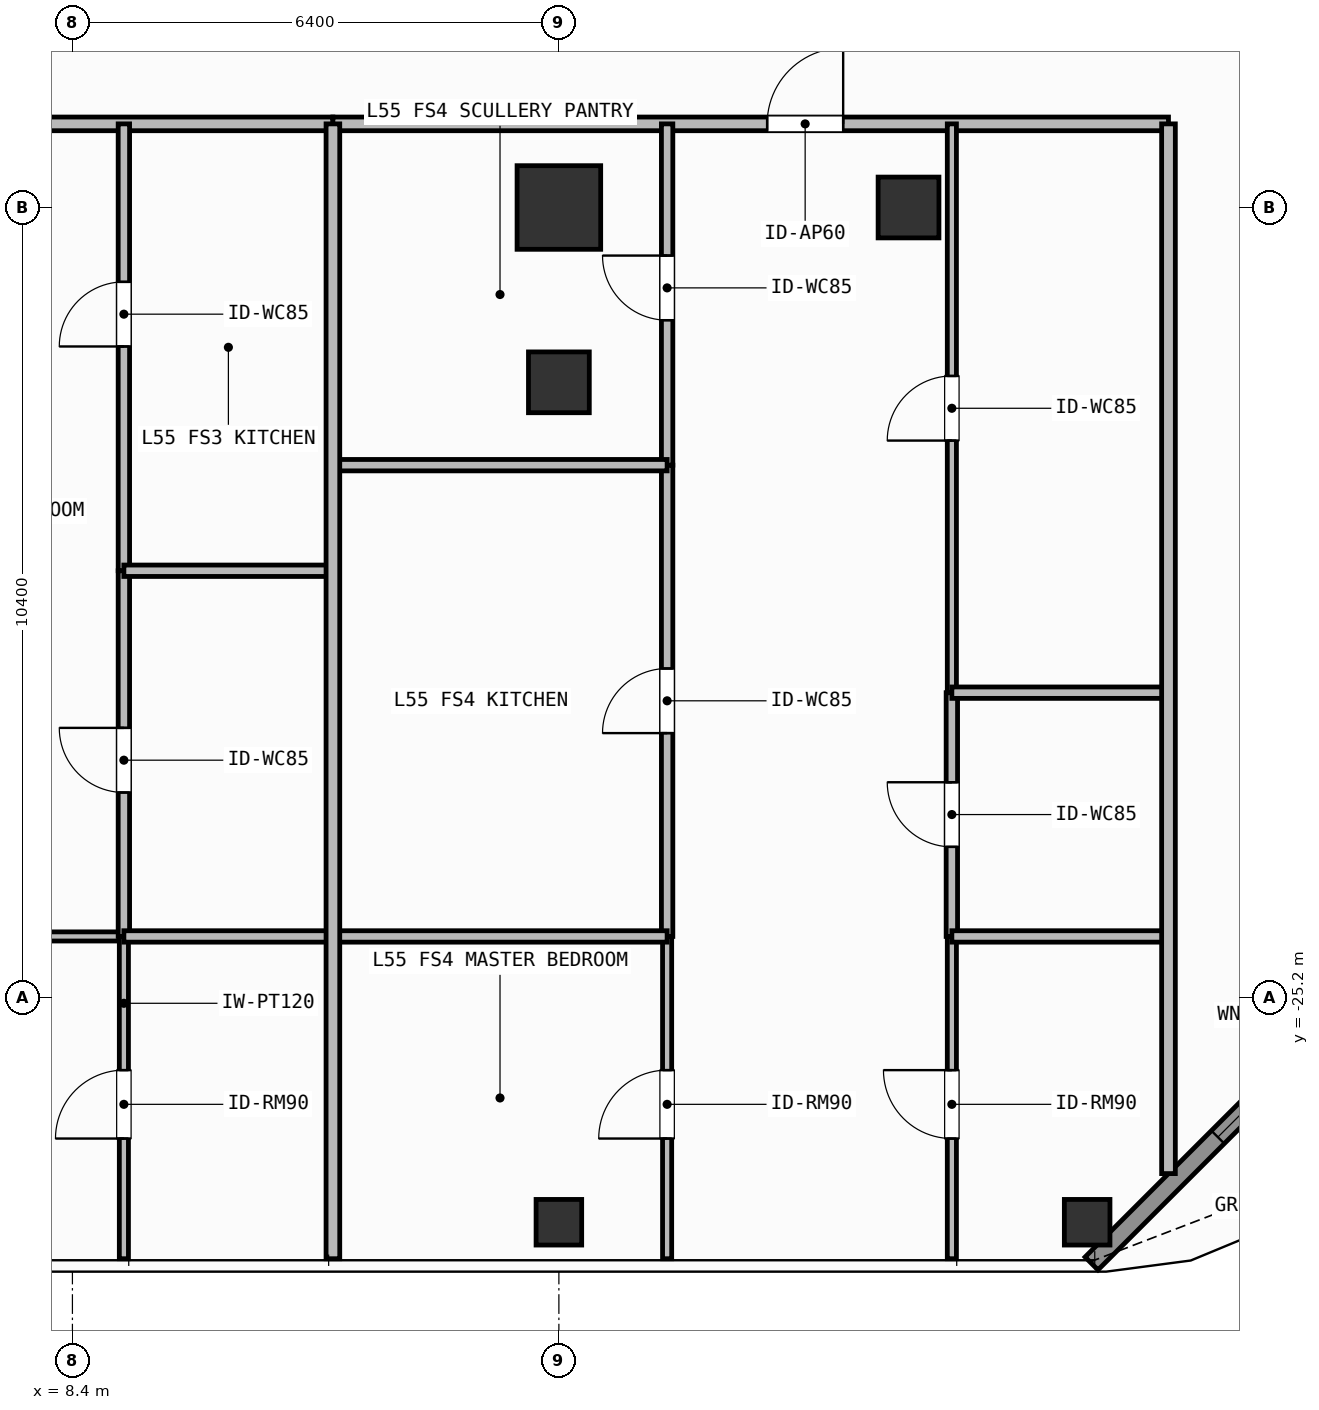
"""IFC4 building model, lengths in metres.
Left out: names, types, materials, properties, quantities, classifications, styles, units other than length and angle.
Written with IfcOpenShell. Run it as: python <this file> out.ifc"""

import sys

from ifc_helpers import new_model, si_unit, direction, frame, frame_2d, origin, origin_2d, place, context, subcontext, project, spatial, rectangle, hollow_rectangle, extrude, element, fill, save


model = new_model("IFC4")
c1 = context("Model", 3, precision=1e-05, world=origin(), true_north=direction((0.0, 1.0)))
c2 = subcontext(c1, "Body", "Model", "MODEL_VIEW")
j1 = project(units=[si_unit("LENGTHUNIT", "METRE"), si_unit("PLANEANGLEUNIT", "RADIAN")], contexts=[c1])
p1 = place(None, origin())
s1 = spatial("IfcSite", under=j1, at=p1, CompositionType="ELEMENT")
p2 = place(p1, origin())
s2 = spatial("IfcBuilding", under=s1, at=p2, CompositionType="ELEMENT")
p3 = place(p2, frame((0.0, 0.0, 223.5)))
s3 = spatial("IfcBuildingStorey", under=s2, at=p3, CompositionType="ELEMENT", Elevation=223.5)
p4 = place(p3, frame((14.8, -14.8, 0.0), z_axis=(0.0, 0.0, 1.0), x_axis=(1.0, 0.0, 0.0)))
e1 = element("IfcColumn", 1, at=p4, inside=s3, PredefinedType="COLUMN", context=c2, shape_type="SweptSolid", body=[
    extrude(rectangle(XDim=1.1, YDim=1.1, at=origin_2d()), origin(), (0.0, 0.0, 1.0), 3.9),
])
for number, where, z_axis, x_axis in (
    (2, (19.4, -14.8, 0.0), (0.0, 0.0, 1.0), (1.0, 0.0, 0.0)),
    (3, (14.8, -17.1, 0.0), (0.0, 0.0, 1.0), (1.0, 0.0, 0.0)),
):
    element("IfcColumn", number, at=place(p3, frame(where, z_axis=z_axis, x_axis=x_axis)), inside=s3, PredefinedType="COLUMN", context=c2, shape_type="SweptSolid", body=[
        extrude(hollow_rectangle(XDim=0.8, YDim=0.8, WallThickness=0.036, at=origin_2d()), origin(), (0.0, 0.0, 1.0), 3.9),
    ])
for number, where, z_axis, x_axis in (
    (4, (21.75, -28.15, 0.0), (0.0, 0.0, 1.0), (1.0, 0.0, 0.0)),
    (5, (14.8, -28.15, 0.0), (0.0, 0.0, 1.0), (1.0, 0.0, 0.0)),
):
    element("IfcColumn", number, at=place(p3, frame(where, z_axis=z_axis, x_axis=x_axis)), inside=s3, PredefinedType="COLUMN", context=c2, shape_type="SweptSolid", body=[
        extrude(hollow_rectangle(XDim=0.6, YDim=0.6, WallThickness=0.028, at=origin_2d()), origin(), (0.0, 0.0, 1.0), 3.9),
    ])
p5 = place(p3, frame((26.192, -24.308, 0.0), z_axis=(0.0, 0.0, 1.0), x_axis=(-0.707106781187, -0.707106781187, 0.0)))
e6 = element("IfcWall", 6, at=p5, inside=s3, PredefinedType="SOLIDWALL", context=c2, shape_type="SweptSolid", body=[
    extrude(rectangle(XDim=6.201, YDim=0.24, at=frame_2d((3.101, 0.0))), origin(), (0.0, 0.0, 1.0), 3.68),
])
p6 = place(p5, frame((2.351, 0.0, 0.8)))
e7 = element("IfcOpeningElement", 7, at=p6, cuts=e6, PredefinedType="OPENING", context=c2, shape_type="SweptSolid", body=[
    extrude(rectangle(XDim=1.5, YDim=1.85, at=frame_2d((0.75, 0.925))), frame((0.0, 0.13, 0.0), z_axis=(0.0, -1.0, 0.0), x_axis=(1.0, 0.0, 0.0)), (0.0, 0.0, 1.0), 0.26),
])
p7 = place(p3, frame((3.9, -13.7, 0.0), z_axis=(0.0, 0.0, 1.0), x_axis=(1.0, 0.0, 0.0)))
e8 = element("IfcWall", 8, at=p7, inside=s3, PredefinedType="PARTITIONING", context=c2, shape_type="SweptSolid", body=[
    extrude(rectangle(XDim=7.927, YDim=0.18, at=frame_2d((3.963, 0.0))), origin(), (0.0, 0.0, 1.0), 3.68),
])
p8 = place(p7, frame((1.767, 0.0, 0.0)))
e9 = element("IfcOpeningElement", 9, at=p8, cuts=e8, PredefinedType="OPENING", context=c2, shape_type="SweptSolid", body=[
    extrude(rectangle(XDim=1.0, YDim=2.2, at=frame_2d((0.5, 1.1))), frame((0.0, 0.1, 0.0), z_axis=(0.0, -1.0, 0.0), x_axis=(1.0, 0.0, 0.0)), (0.0, 0.0, 1.0), 0.2),
])
p9 = place(p3, frame((3.9, -24.39, 0.0), z_axis=(0.0, 0.0, 1.0), x_axis=(1.0, 0.0, 0.0)))
e10 = element("IfcWall", 10, at=p9, inside=s3, PredefinedType="PARTITIONING", context=c2, shape_type="SweptSolid", body=[
    extrude(rectangle(XDim=5.177, YDim=0.12, at=frame_2d((2.588, 0.0))), origin(), (0.0, 0.0, 1.0), 3.68),
])
p10 = place(p9, frame((2.138, 0.0, 0.0)))
e11 = element("IfcOpeningElement", 11, at=p10, cuts=e10, PredefinedType="OPENING", context=c2, shape_type="SweptSolid", body=[
    extrude(rectangle(XDim=0.9, YDim=2.1, at=frame_2d((0.45, 1.05))), frame((0.0, 0.07, 0.0), z_axis=(0.0, -1.0, 0.0), x_axis=(1.0, 0.0, 0.0)), (0.0, 0.0, 1.0), 0.14),
])
p11 = place(p3, frame((9.077, -19.579, 0.0), z_axis=(0.0, 0.0, 1.0), x_axis=(0.0, 1.0, 0.0)))
e12 = element("IfcWall", 12, at=p11, inside=s3, PredefinedType="PARTITIONING", context=c2, shape_type="SweptSolid", body=[
    extrude(rectangle(XDim=5.879, YDim=0.15, at=frame_2d((2.939, 0.0))), origin(), (0.0, 0.0, 1.0), 3.68),
])
p12 = place(p11, frame((2.95, 0.0, 0.0)))
e13 = element("IfcOpeningElement", 13, at=p12, cuts=e12, PredefinedType="OPENING", context=c2, shape_type="SweptSolid", body=[
    extrude(rectangle(XDim=0.85, YDim=2.1, at=frame_2d((0.425, 1.05))), frame((0.0, 0.085, 0.0), z_axis=(0.0, -1.0, 0.0), x_axis=(1.0, 0.0, 0.0)), (0.0, 0.0, 1.0), 0.17),
])
p13 = place(p3, frame((9.077, -24.39, 0.0), z_axis=(0.0, 0.0, 1.0), x_axis=(0.0, 1.0, 0.0)))
e14 = element("IfcWall", 14, at=p13, inside=s3, PredefinedType="PARTITIONING", context=c2, shape_type="SweptSolid", body=[
    extrude(rectangle(XDim=4.811, YDim=0.15, at=frame_2d((2.405, 0.0))), origin(), (0.0, 0.0, 1.0), 3.68),
])
p14 = place(p13, frame((1.894, 0.0, 0.0)))
e15 = element("IfcOpeningElement", 15, at=p14, cuts=e14, PredefinedType="OPENING", context=c2, shape_type="SweptSolid", body=[
    extrude(rectangle(XDim=0.85, YDim=2.1, at=frame_2d((0.425, 1.05))), frame((0.0, 0.085, 0.0), z_axis=(0.0, -1.0, 0.0), x_axis=(1.0, 0.0, 0.0)), (0.0, 0.0, 1.0), 0.17),
])
p15 = place(p3, frame((9.077, -28.63, 0.0), z_axis=(0.0, 0.0, 1.0), x_axis=(0.0, 1.0, 0.0)))
e16 = element("IfcWall", 16, at=p15, inside=s3, PredefinedType="PARTITIONING", context=c2, shape_type="SweptSolid", body=[
    extrude(rectangle(XDim=4.24, YDim=0.12, at=frame_2d((2.12, 0.0))), origin(), (0.0, 0.0, 1.0), 3.68),
])
p16 = place(p15, frame((1.581, 0.0, 0.0)))
e17 = element("IfcOpeningElement", 17, at=p16, cuts=e16, PredefinedType="OPENING", context=c2, shape_type="SweptSolid", body=[
    extrude(rectangle(XDim=0.9, YDim=2.1, at=frame_2d((0.45, 1.05))), frame((0.0, 0.07, 0.0), z_axis=(0.0, -1.0, 0.0), x_axis=(1.0, 0.0, 0.0)), (0.0, 0.0, 1.0), 0.14),
])
p17 = place(p3, frame((11.827, -13.7, 0.0), z_axis=(0.0, 0.0, 1.0), x_axis=(1.0, 0.0, 0.0)))
e18 = element("IfcWall", 18, at=p17, inside=s3, PredefinedType="PARTITIONING", context=c2, shape_type="SweptSolid", body=[
    extrude(rectangle(XDim=10.993, YDim=0.18, at=frame_2d((5.497, 0.0))), origin(), (0.0, 0.0, 1.0), 3.68),
])
p18 = place(p17, frame((5.713, 0.0, 0.0)))
e19 = element("IfcOpeningElement", 19, at=p18, cuts=e18, PredefinedType="OPENING", context=c2, shape_type="SweptSolid", body=[
    extrude(rectangle(XDim=1.0, YDim=2.2, at=frame_2d((0.5, 1.1))), frame((0.0, 0.1, 0.0), z_axis=(0.0, -1.0, 0.0), x_axis=(1.0, 0.0, 0.0)), (0.0, 0.0, 1.0), 0.2),
])
p19 = place(p3, frame((16.224, -24.39, 0.0), z_axis=(0.0, 0.0, 1.0), x_axis=(0.0, 1.0, 0.0)))
e20 = element("IfcWall", 20, at=p19, inside=s3, PredefinedType="PARTITIONING", context=c2, shape_type="SweptSolid", body=[
    extrude(rectangle(XDim=6.2, YDim=0.15, at=frame_2d((3.1, 0.0))), origin(), (0.0, 0.0, 1.0), 3.68),
])
p20 = place(p19, frame((2.675, 0.0, 0.0)))
e21 = element("IfcOpeningElement", 21, at=p20, cuts=e20, PredefinedType="OPENING", context=c2, shape_type="SweptSolid", body=[
    extrude(rectangle(XDim=0.85, YDim=2.1, at=frame_2d((0.425, 1.05))), frame((0.0, 0.085, 0.0), z_axis=(0.0, -1.0, 0.0), x_axis=(1.0, 0.0, 0.0)), (0.0, 0.0, 1.0), 0.17),
])
p21 = place(p3, frame((16.224, -18.19, 0.0), z_axis=(0.0, 0.0, 1.0), x_axis=(0.0, 1.0, 0.0)))
e22 = element("IfcWall", 22, at=p21, inside=s3, PredefinedType="PARTITIONING", context=c2, shape_type="SweptSolid", body=[
    extrude(rectangle(XDim=4.49, YDim=0.15, at=frame_2d((2.245, 0.0))), origin(), (0.0, 0.0, 1.0), 3.68),
])
p22 = place(p21, frame((1.907, 0.0, 0.0)))
e23 = element("IfcOpeningElement", 23, at=p22, cuts=e22, PredefinedType="OPENING", context=c2, shape_type="SweptSolid", body=[
    extrude(rectangle(XDim=0.85, YDim=2.1, at=frame_2d((0.425, 1.05))), frame((0.0, 0.085, 0.0), z_axis=(0.0, -1.0, 0.0), x_axis=(1.0, 0.0, 0.0)), (0.0, 0.0, 1.0), 0.17),
])
p23 = place(p3, frame((16.224, -28.63, 0.0), z_axis=(0.0, 0.0, 1.0), x_axis=(0.0, 1.0, 0.0)))
e24 = element("IfcWall", 24, at=p23, inside=s3, PredefinedType="PARTITIONING", context=c2, shape_type="SweptSolid", body=[
    extrude(rectangle(XDim=4.24, YDim=0.12, at=frame_2d((2.12, 0.0))), origin(), (0.0, 0.0, 1.0), 3.68),
])
p24 = place(p23, frame((1.581, 0.0, 0.0)))
e25 = element("IfcOpeningElement", 25, at=p24, cuts=e24, PredefinedType="OPENING", context=c2, shape_type="SweptSolid", body=[
    extrude(rectangle(XDim=0.9, YDim=2.1, at=frame_2d((0.45, 1.05))), frame((0.0, 0.07, 0.0), z_axis=(0.0, -1.0, 0.0), x_axis=(1.0, 0.0, 0.0)), (0.0, 0.0, 1.0), 0.14),
])
p25 = place(p3, frame((19.97, -24.39, 0.0), z_axis=(0.0, 0.0, 1.0), x_axis=(0.0, 1.0, 0.0)))
e26 = element("IfcWall", 26, at=p25, inside=s3, PredefinedType="PARTITIONING", context=c2, shape_type="SweptSolid", body=[
    extrude(rectangle(XDim=3.207, YDim=0.15, at=frame_2d((1.604, 0.0))), origin(), (0.0, 0.0, 1.0), 3.68),
])
p26 = place(p25, frame((1.178, 0.0, 0.0)))
e27 = element("IfcOpeningElement", 27, at=p26, cuts=e26, PredefinedType="OPENING", context=c2, shape_type="SweptSolid", body=[
    extrude(rectangle(XDim=0.85, YDim=2.1, at=frame_2d((0.425, 1.05))), frame((0.0, 0.085, 0.0), z_axis=(0.0, -1.0, 0.0), x_axis=(1.0, 0.0, 0.0)), (0.0, 0.0, 1.0), 0.17),
])
p27 = place(p3, frame((19.97, -21.183, 0.0), z_axis=(0.0, 0.0, 1.0), x_axis=(0.0, 1.0, 0.0)))
e28 = element("IfcWall", 28, at=p27, inside=s3, PredefinedType="PARTITIONING", context=c2, shape_type="SweptSolid", body=[
    extrude(rectangle(XDim=7.483, YDim=0.12, at=frame_2d((3.742, 0.0))), origin(), (0.0, 0.0, 1.0), 3.68),
])
p28 = place(p27, frame((3.316, 0.0, 0.0)))
e29 = element("IfcOpeningElement", 29, at=p28, cuts=e28, PredefinedType="OPENING", context=c2, shape_type="SweptSolid", body=[
    extrude(rectangle(XDim=0.85, YDim=2.1, at=frame_2d((0.425, 1.05))), frame((0.0, 0.07, 0.0), z_axis=(0.0, -1.0, 0.0), x_axis=(1.0, 0.0, 0.0)), (0.0, 0.0, 1.0), 0.14),
])
p29 = place(p3, frame((19.97, -28.63, 0.0), z_axis=(0.0, 0.0, 1.0), x_axis=(0.0, 1.0, 0.0)))
e30 = element("IfcWall", 30, at=p29, inside=s3, PredefinedType="PARTITIONING", context=c2, shape_type="SweptSolid", body=[
    extrude(rectangle(XDim=4.24, YDim=0.12, at=frame_2d((2.12, 0.0))), origin(), (0.0, 0.0, 1.0), 3.68),
])
p30 = place(p29, frame((1.581, 0.0, 0.0)))
e31 = element("IfcOpeningElement", 31, at=p30, cuts=e30, PredefinedType="OPENING", context=c2, shape_type="SweptSolid", body=[
    extrude(rectangle(XDim=0.9, YDim=2.1, at=frame_2d((0.45, 1.05))), frame((0.0, 0.07, 0.0), z_axis=(0.0, -1.0, 0.0), x_axis=(1.0, 0.0, 0.0)), (0.0, 0.0, 1.0), 0.14),
])
for number, where, z_axis, x_axis in (
    (32, (9.077, -19.579, 0.0), (0.0, 0.0, 1.0), (1.0, 0.0, 0.0)),
    (33, (9.077, -24.39, 0.0), (0.0, 0.0, 1.0), (1.0, 0.0, 0.0)),
):
    element("IfcWall", number, at=place(p3, frame(where, z_axis=z_axis, x_axis=x_axis)), inside=s3, PredefinedType="PARTITIONING", context=c2, shape_type="SweptSolid", body=[
        extrude(rectangle(XDim=2.75, YDim=0.15, at=frame_2d((1.375, 0.0))), origin(), (0.0, 0.0, 1.0), 3.68),
    ])
for number, where, z_axis, x_axis in (
    (34, (11.827, -18.19, 0.0), (0.0, 0.0, 1.0), (1.0, 0.0, 0.0)),
    (35, (11.827, -24.39, 0.0), (0.0, 0.0, 1.0), (1.0, 0.0, 0.0)),
):
    element("IfcWall", number, at=place(p3, frame(where, z_axis=z_axis, x_axis=x_axis)), inside=s3, PredefinedType="PARTITIONING", context=c2, shape_type="SweptSolid", body=[
        extrude(rectangle(XDim=4.397, YDim=0.15, at=frame_2d((2.199, 0.0))), origin(), (0.0, 0.0, 1.0), 3.68),
    ])
for number, where, z_axis, x_axis in (
    (36, (19.97, -21.183, 0.0), (0.0, 0.0, 1.0), (1.0, 0.0, 0.0)),
    (37, (19.97, -24.39, 0.0), (0.0, 0.0, 1.0), (1.0, 0.0, 0.0)),
):
    element("IfcWall", number, at=place(p3, frame(where, z_axis=z_axis, x_axis=x_axis)), inside=s3, PredefinedType="PARTITIONING", context=c2, shape_type="SweptSolid", body=[
        extrude(rectangle(XDim=2.85, YDim=0.15, at=frame_2d((1.425, 0.0))), origin(), (0.0, 0.0, 1.0), 3.68),
    ])
p31 = place(p3, frame((11.827, -28.63, 0.0), z_axis=(0.0, 0.0, 1.0), x_axis=(0.0, 1.0, 0.0)))
e38 = element("IfcWall", 38, at=p31, inside=s3, PredefinedType="PARTITIONING", context=c2, shape_type="SweptSolid", body=[
    extrude(rectangle(XDim=14.93, YDim=0.18, at=frame_2d((7.465, 0.0))), origin(), (0.0, 0.0, 1.0), 3.68),
])
p32 = place(p3, frame((22.82, -27.51, 0.0), z_axis=(0.0, 0.0, 1.0), x_axis=(0.0, 1.0, 0.0)))
e39 = element("IfcWall", 39, at=p32, inside=s3, PredefinedType="PARTITIONING", context=c2, shape_type="SweptSolid", body=[
    extrude(rectangle(XDim=13.81, YDim=0.18, at=frame_2d((6.905, 0.0))), origin(), (0.0, 0.0, 1.0), 3.68),
])
p33 = place(p6, origin())
e40 = element("IfcWindow", 40, at=p33, inside=s3, PartitioningType="SINGLE_PANEL", PredefinedType="WINDOW", context=c2, shape_type="SweptSolid", body=[
    extrude(rectangle(XDim=1.5, YDim=1.85, at=frame_2d((0.75, 0.925))), frame((0.0, 0.03, 0.0), z_axis=(0.0, -1.0, 0.0), x_axis=(1.0, 0.0, 0.0)), (0.0, 0.0, 1.0), 0.06),
])
fill(e7, e40)
p34 = place(p12, origin())
e41 = element("IfcDoor", 41, at=p34, inside=s3, OperationType="SINGLE_SWING_LEFT", PredefinedType="DOOR", context=c2, shape_type="SweptSolid", body=[
    extrude(rectangle(XDim=0.85, YDim=2.1, at=frame_2d((0.425, 1.05))), frame((0.0, 0.025, 0.0), z_axis=(0.0, -1.0, 0.0), x_axis=(1.0, 0.0, 0.0)), (0.0, 0.0, 1.0), 0.05),
])
fill(e13, e41)
p35 = place(p14, origin())
e42 = element("IfcDoor", 42, at=p35, inside=s3, OperationType="SINGLE_SWING_RIGHT", PredefinedType="DOOR", context=c2, shape_type="SweptSolid", body=[
    extrude(rectangle(XDim=0.85, YDim=2.1, at=frame_2d((0.425, 1.05))), frame((0.0, 0.025, 0.0), z_axis=(0.0, -1.0, 0.0), x_axis=(1.0, 0.0, 0.0)), (0.0, 0.0, 1.0), 0.05),
])
fill(e15, e42)
p36 = place(p16, origin())
e43 = element("IfcDoor", 43, at=p36, inside=s3, OperationType="SINGLE_SWING_LEFT", PredefinedType="DOOR", context=c2, shape_type="SweptSolid", body=[
    extrude(rectangle(XDim=0.9, YDim=2.1, at=frame_2d((0.45, 1.05))), frame((0.0, 0.025, 0.0), z_axis=(0.0, -1.0, 0.0), x_axis=(1.0, 0.0, 0.0)), (0.0, 0.0, 1.0), 0.05),
])
fill(e17, e43)
p37 = place(p18, origin())
e44 = element("IfcDoor", 44, at=p37, inside=s3, OperationType="SINGLE_SWING_RIGHT", PredefinedType="DOOR", context=c2, shape_type="SweptSolid", body=[
    extrude(rectangle(XDim=1.0, YDim=2.2, at=frame_2d((0.5, 1.1))), frame((0.0, 0.025, 0.0), z_axis=(0.0, -1.0, 0.0), x_axis=(1.0, 0.0, 0.0)), (0.0, 0.0, 1.0), 0.05),
])
fill(e19, e44)
p38 = place(p20, origin())
e45 = element("IfcDoor", 45, at=p38, inside=s3, OperationType="SINGLE_SWING_LEFT", PredefinedType="DOOR", context=c2, shape_type="SweptSolid", body=[
    extrude(rectangle(XDim=0.85, YDim=2.1, at=frame_2d((0.425, 1.05))), frame((0.0, 0.025, 0.0), z_axis=(0.0, -1.0, 0.0), x_axis=(1.0, 0.0, 0.0)), (0.0, 0.0, 1.0), 0.05),
])
fill(e21, e45)
p39 = place(p22, origin())
e46 = element("IfcDoor", 46, at=p39, inside=s3, OperationType="SINGLE_SWING_RIGHT", PredefinedType="DOOR", context=c2, shape_type="SweptSolid", body=[
    extrude(rectangle(XDim=0.85, YDim=2.1, at=frame_2d((0.425, 1.05))), frame((0.0, 0.025, 0.0), z_axis=(0.0, -1.0, 0.0), x_axis=(1.0, 0.0, 0.0)), (0.0, 0.0, 1.0), 0.05),
])
fill(e23, e46)
p40 = place(p24, origin())
e47 = element("IfcDoor", 47, at=p40, inside=s3, OperationType="SINGLE_SWING_LEFT", PredefinedType="DOOR", context=c2, shape_type="SweptSolid", body=[
    extrude(rectangle(XDim=0.9, YDim=2.1, at=frame_2d((0.45, 1.05))), frame((0.0, 0.025, 0.0), z_axis=(0.0, -1.0, 0.0), x_axis=(1.0, 0.0, 0.0)), (0.0, 0.0, 1.0), 0.05),
])
fill(e25, e47)
p41 = place(p26, origin())
e48 = element("IfcDoor", 48, at=p41, inside=s3, OperationType="SINGLE_SWING_RIGHT", PredefinedType="DOOR", context=c2, shape_type="SweptSolid", body=[
    extrude(rectangle(XDim=0.85, YDim=2.1, at=frame_2d((0.425, 1.05))), frame((0.0, 0.025, 0.0), z_axis=(0.0, -1.0, 0.0), x_axis=(1.0, 0.0, 0.0)), (0.0, 0.0, 1.0), 0.05),
])
fill(e27, e48)
p42 = place(p28, origin())
e49 = element("IfcDoor", 49, at=p42, inside=s3, OperationType="SINGLE_SWING_LEFT", PredefinedType="DOOR", context=c2, shape_type="SweptSolid", body=[
    extrude(rectangle(XDim=0.85, YDim=2.1, at=frame_2d((0.425, 1.05))), frame((0.0, 0.025, 0.0), z_axis=(0.0, -1.0, 0.0), x_axis=(1.0, 0.0, 0.0)), (0.0, 0.0, 1.0), 0.05),
])
fill(e29, e49)
p43 = place(p30, origin())
e50 = element("IfcDoor", 50, at=p43, inside=s3, OperationType="SINGLE_SWING_RIGHT", PredefinedType="DOOR", context=c2, shape_type="SweptSolid", body=[
    extrude(rectangle(XDim=0.9, YDim=2.1, at=frame_2d((0.45, 1.05))), frame((0.0, 0.025, 0.0), z_axis=(0.0, -1.0, 0.0), x_axis=(1.0, 0.0, 0.0)), (0.0, 0.0, 1.0), 0.05),
])
fill(e31, e50)
save(model, sys.argv[1])
